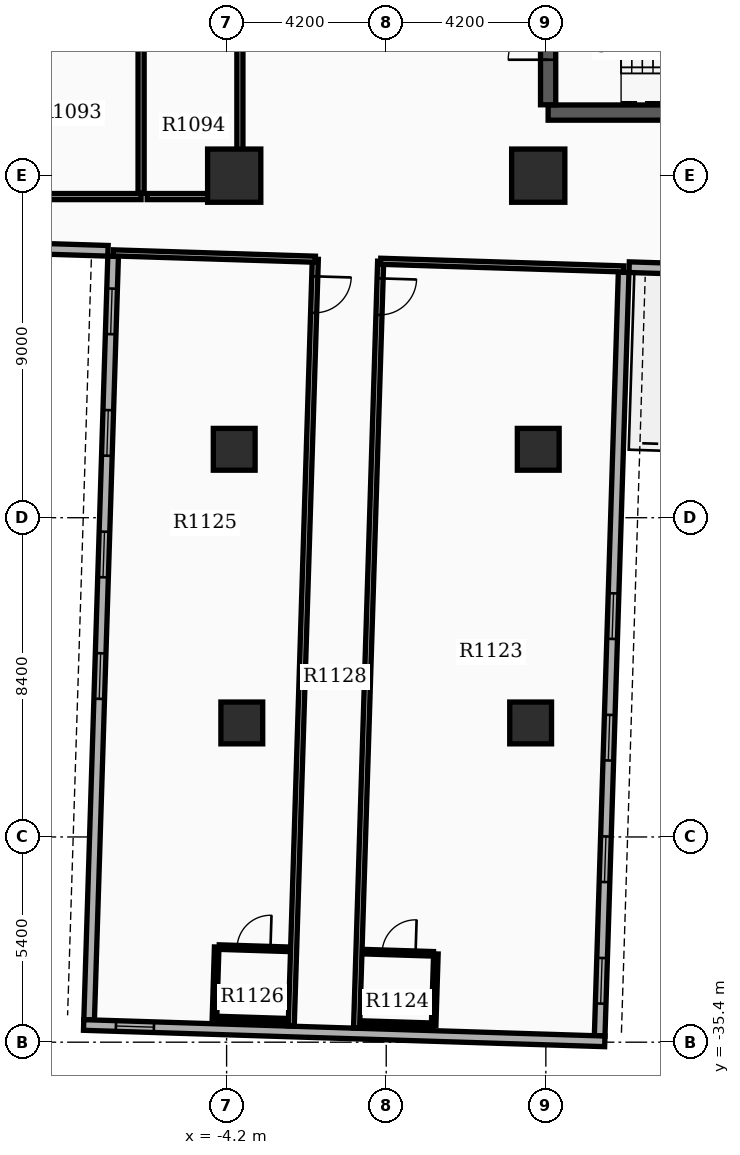
"""IFC4 building model, lengths in metres.
Left out: names, types, materials, properties, quantities, classifications, styles, units other than length and angle.
Written with IfcOpenShell. Run it as: python <this file> out.ifc"""

import sys

from ifc_helpers import new_model, si_unit, direction, frame, frame_2d, origin, origin_2d, place, context, subcontext, project, spatial, rectangle, extrude, element, fill, save


model = new_model("IFC4")
c1 = context("Model", 3, precision=1e-05, world=origin(), true_north=direction((0.0, 1.0)))
c2 = subcontext(c1, "Body", "Model", "MODEL_VIEW")
j1 = project(units=[si_unit("LENGTHUNIT", "METRE"), si_unit("PLANEANGLEUNIT", "RADIAN")], contexts=[c1])
p1 = place(None, origin())
s1 = spatial("IfcSite", under=j1, at=p1, CompositionType="ELEMENT")
p2 = place(p1, origin())
s2 = spatial("IfcBuilding", under=s1, at=p2, CompositionType="ELEMENT")
p3 = place(p2, frame((0.0, 0.0, 71.7)))
s3 = spatial("IfcBuildingStorey", under=s2, at=p3, CompositionType="ELEMENT", Elevation=71.7)
p4 = place(p3, frame((4.26, -10.94, 0.0), z_axis=(0.0, 0.0, 1.0), x_axis=(1.0, 0.0, 0.0)))
e1 = element("IfcWall", 1, at=p4, inside=s3, PredefinedType="SHEAR", context=c2, shape_type="SweptSolid", body=[
    extrude(rectangle(XDim=7.96, YDim=0.4, at=frame_2d((3.98, 0.0))), origin(), (0.0, 0.0, 1.0), 3.7),
])
p5 = place(p3, frame((4.26, -10.735, 0.0), z_axis=(0.0, 0.0, 1.0), x_axis=(0.0, 1.0, 0.0)))
e2 = element("IfcWall", 2, at=p5, inside=s3, PredefinedType="SHEAR", context=c2, shape_type="SweptSolid", body=[
    extrude(rectangle(XDim=3.43, YDim=0.4, at=frame_2d((1.715, 0.0))), origin(), (0.0, 0.0, 1.0), 3.7),
])
p6 = place(p5, frame((1.185, 0.0, 0.0)))
e3 = element("IfcOpeningElement", 3, at=p6, cuts=e2, PredefinedType="OPENING", context=c2, shape_type="SweptSolid", body=[
    extrude(rectangle(XDim=1.05, YDim=2.15, at=frame_2d((0.525, 1.075))), frame((0.0, 0.21, 0.0), z_axis=(0.0, -1.0, 0.0), x_axis=(1.0, 0.0, 0.0)), (0.0, 0.0, 1.0), 0.42),
])
for number, where, z_axis, x_axis in (
    (4, (-4.0, -12.6, 0.0), (0.0, 0.0, 1.0), (1.0, 0.0, 0.0)),
    (5, (4.0, -12.6, 0.0), (0.0, 0.0, 1.0), (1.0, 0.0, 0.0)),
):
    element("IfcColumn", number, at=place(p3, frame(where, z_axis=z_axis, x_axis=x_axis)), inside=s3, PredefinedType="COLUMN", context=c2, shape_type="SweptSolid", body=[
        extrude(rectangle(XDim=1.4, YDim=1.4, at=origin_2d()), origin(), (0.0, 0.0, 1.0), 3.9),
    ])
for number, where, z_axis, x_axis in (
    (6, (-4.0, -19.8, 0.0), (0.0, 0.0, 1.0), (1.0, 0.0, 0.0)),
    (7, (4.0, -19.8, 0.0), (0.0, 0.0, 1.0), (1.0, 0.0, 0.0)),
    (8, (-3.8, -27.0, 0.0), (0.0, 0.0, 1.0), (1.0, 0.0, 0.0)),
    (9, (3.8, -27.0, 0.0), (0.0, 0.0, 1.0), (1.0, 0.0, 0.0)),
):
    element("IfcColumn", number, at=place(p3, frame(where, z_axis=z_axis, x_axis=x_axis)), inside=s3, PredefinedType="COLUMN", context=c2, shape_type="SweptSolid", body=[
        extrude(rectangle(XDim=1.1, YDim=1.1, at=origin_2d()), origin(), (0.0, 0.0, 1.0), 3.9),
    ])
p7 = place(p3, frame((-7.186, -14.721, 0.0), z_axis=(0.0, 0.0, 1.0), x_axis=(-0.031410322165, -0.999506574096, 0.0)))
e10 = element("IfcWall", 10, at=p7, inside=s3, PredefinedType="STANDARD", context=c2, shape_type="SweptSolid", body=[
    extrude(rectangle(XDim=20.1, YDim=0.28, at=frame_2d((10.05, 0.0))), origin(), (0.0, 0.0, 1.0), 2.91),
])
p8 = place(p7, frame((0.85, 0.0, 0.8)))
e11 = element("IfcOpeningElement", 11, at=p8, cuts=e10, PredefinedType="OPENING", context=c2, shape_type="SweptSolid", body=[
    extrude(rectangle(XDim=1.2, YDim=1.6, at=frame_2d((0.6, 0.8))), frame((0.0, 0.15, 0.0), z_axis=(0.0, -1.0, 0.0), x_axis=(1.0, 0.0, 0.0)), (0.0, 0.0, 1.0), 0.3),
])
p9 = place(p7, frame((4.05, 0.0, 0.8)))
e12 = element("IfcOpeningElement", 12, at=p9, cuts=e10, PredefinedType="OPENING", context=c2, shape_type="SweptSolid", body=[
    extrude(rectangle(XDim=1.2, YDim=1.6, at=frame_2d((0.6, 0.8))), frame((0.0, 0.15, 0.0), z_axis=(0.0, -1.0, 0.0), x_axis=(1.0, 0.0, 0.0)), (0.0, 0.0, 1.0), 0.3),
])
p10 = place(p7, frame((7.25, 0.0, 0.8)))
e13 = element("IfcOpeningElement", 13, at=p10, cuts=e10, PredefinedType="OPENING", context=c2, shape_type="SweptSolid", body=[
    extrude(rectangle(XDim=1.2, YDim=1.6, at=frame_2d((0.6, 0.8))), frame((0.0, 0.15, 0.0), z_axis=(0.0, -1.0, 0.0), x_axis=(1.0, 0.0, 0.0)), (0.0, 0.0, 1.0), 0.3),
])
p11 = place(p7, frame((10.45, 0.0, 0.8)))
e14 = element("IfcOpeningElement", 14, at=p11, cuts=e10, PredefinedType="OPENING", context=c2, shape_type="SweptSolid", body=[
    extrude(rectangle(XDim=1.2, YDim=1.6, at=frame_2d((0.6, 0.8))), frame((0.0, 0.15, 0.0), z_axis=(0.0, -1.0, 0.0), x_axis=(1.0, 0.0, 0.0)), (0.0, 0.0, 1.0), 0.3),
])
p12 = place(p3, frame((5.616, -35.234, 0.0), z_axis=(0.0, 0.0, 1.0), x_axis=(0.031398187845, 0.999506955354, 0.0)))
e15 = element("IfcWall", 15, at=p12, inside=s3, PredefinedType="STANDARD", context=c2, shape_type="SweptSolid", body=[
    extrude(rectangle(XDim=20.1, YDim=0.28, at=frame_2d((10.05, 0.0))), origin(), (0.0, 0.0, 1.0), 2.91),
])
p13 = place(p12, frame((0.85, 0.0, 0.8)))
e16 = element("IfcOpeningElement", 16, at=p13, cuts=e15, PredefinedType="OPENING", context=c2, shape_type="SweptSolid", body=[
    extrude(rectangle(XDim=1.2, YDim=1.6, at=frame_2d((0.6, 0.8))), frame((0.0, 0.15, 0.0), z_axis=(0.0, -1.0, 0.0), x_axis=(1.0, 0.0, 0.0)), (0.0, 0.0, 1.0), 0.3),
])
p14 = place(p12, frame((4.05, 0.0, 0.8)))
e17 = element("IfcOpeningElement", 17, at=p14, cuts=e15, PredefinedType="OPENING", context=c2, shape_type="SweptSolid", body=[
    extrude(rectangle(XDim=1.2, YDim=1.6, at=frame_2d((0.6, 0.8))), frame((0.0, 0.15, 0.0), z_axis=(0.0, -1.0, 0.0), x_axis=(1.0, 0.0, 0.0)), (0.0, 0.0, 1.0), 0.3),
])
p15 = place(p12, frame((7.25, 0.0, 0.8)))
e18 = element("IfcOpeningElement", 18, at=p15, cuts=e15, PredefinedType="OPENING", context=c2, shape_type="SweptSolid", body=[
    extrude(rectangle(XDim=1.2, YDim=1.6, at=frame_2d((0.6, 0.8))), frame((0.0, 0.15, 0.0), z_axis=(0.0, -1.0, 0.0), x_axis=(1.0, 0.0, 0.0)), (0.0, 0.0, 1.0), 0.3),
])
p16 = place(p12, frame((10.45, 0.0, 0.8)))
e19 = element("IfcOpeningElement", 19, at=p16, cuts=e15, PredefinedType="OPENING", context=c2, shape_type="SweptSolid", body=[
    extrude(rectangle(XDim=1.2, YDim=1.6, at=frame_2d((0.6, 0.8))), frame((0.0, 0.15, 0.0), z_axis=(0.0, -1.0, 0.0), x_axis=(1.0, 0.0, 0.0)), (0.0, 0.0, 1.0), 0.3),
])
p17 = place(p3, frame((-7.962, -34.947, 0.0), z_axis=(0.0, 0.0, 1.0), x_axis=(0.999506679556, -0.031406966164, 0.0)))
e20 = element("IfcWall", 20, at=p17, inside=s3, PredefinedType="STANDARD", context=c2, shape_type="SweptSolid", body=[
    extrude(rectangle(XDim=13.72, YDim=0.28, at=frame_2d((6.86, 0.0))), origin(), (0.0, 0.0, 1.0), 2.91),
])
p18 = place(p17, frame((0.85, 0.0, 0.85)))
e21 = element("IfcOpeningElement", 21, at=p18, cuts=e20, PredefinedType="OPENING", context=c2, shape_type="SweptSolid", body=[
    extrude(rectangle(XDim=1.0, YDim=1.5, at=frame_2d((0.5, 0.75))), frame((0.0, 0.15, 0.0), z_axis=(0.0, -1.0, 0.0), x_axis=(1.0, 0.0, 0.0)), (0.0, 0.0, 1.0), 0.3),
])
p19 = place(p3, frame((-13.618, -14.379, 0.0), z_axis=(0.0, 0.0, 1.0), x_axis=(0.999507224741, -0.031389611199, 0.0)))
e22 = element("IfcWall", 22, at=p19, inside=s3, PredefinedType="STANDARD", context=c2, shape_type="SweptSolid", body=[
    extrude(rectangle(XDim=6.3, YDim=0.28, at=frame_2d((3.15, 0.0))), origin(), (0.0, 0.0, 1.0), 2.91),
])
p20 = place(p3, frame((12.689, -15.206, 0.0), z_axis=(0.0, 0.0, 1.0), x_axis=(-0.999507262922, 0.031388395416, 0.0)))
e23 = element("IfcWall", 23, at=p20, inside=s3, PredefinedType="STANDARD", context=c2, shape_type="SweptSolid", body=[
    extrude(rectangle(XDim=6.3, YDim=0.28, at=frame_2d((3.15, 0.0))), origin(), (0.0, 0.0, 1.0), 2.91),
])
p21 = place(p3, frame((-12.4, -13.15, 0.0), z_axis=(0.0, 0.0, 1.0), x_axis=(1.0, 0.0, 0.0)))
e24 = element("IfcWall", 24, at=p21, inside=s3, PredefinedType="PARTITIONING", context=c2, shape_type="SweptSolid", body=[
    extrude(rectangle(XDim=5.95, YDim=0.16, at=frame_2d((2.975, 0.0))), origin(), (0.0, 0.0, 1.0), 2.9),
])
p22 = place(p3, frame((-6.45, -13.065, 0.0), z_axis=(0.0, 0.0, 1.0), x_axis=(0.0, 1.0, 0.0)))
e25 = element("IfcWall", 25, at=p22, inside=s3, PredefinedType="PARTITIONING", context=c2, shape_type="SweptSolid", body=[
    extrude(rectangle(XDim=4.23, YDim=0.16, at=frame_2d((2.115, 0.0))), origin(), (0.0, 0.0, 1.0), 2.9),
])
p23 = place(p3, frame((-6.29, -13.15, 0.0), z_axis=(0.0, 0.0, 1.0), x_axis=(1.0, 0.0, 0.0)))
e26 = element("IfcWall", 26, at=p23, inside=s3, PredefinedType="PARTITIONING", context=c2, shape_type="SweptSolid", body=[
    extrude(rectangle(XDim=2.44, YDim=0.16, at=frame_2d((1.22, 0.0))), origin(), (0.0, 0.0, 1.0), 2.9),
])
p24 = place(p3, frame((-3.85, -13.065, 0.0), z_axis=(0.0, 0.0, 1.0), x_axis=(0.0, 1.0, 0.0)))
e27 = element("IfcWall", 27, at=p24, inside=s3, PredefinedType="PARTITIONING", context=c2, shape_type="SweptSolid", body=[
    extrude(rectangle(XDim=4.23, YDim=0.16, at=frame_2d((2.115, 0.0))), origin(), (0.0, 0.0, 1.0), 2.9),
])
p25 = place(p3, frame((-0.146, -14.853, 0.0), z_axis=(0.0, 0.0, 1.0), x_axis=(-0.031415650687, -0.999506406629, 0.0)))
e28 = element("IfcWall", 28, at=p25, inside=s3, PredefinedType="PARTITIONING", context=c2, shape_type="SweptSolid", body=[
    extrude(rectangle(XDim=20.182, YDim=0.16, at=frame_2d((10.091, 0.0))), origin(), (0.0, 0.0, 1.0), 2.9),
])
p26 = place(p25, frame((0.45, 0.0, 0.0)))
e29 = element("IfcOpeningElement", 29, at=p26, cuts=e28, PredefinedType="OPENING", context=c2, shape_type="SweptSolid", body=[
    extrude(rectangle(XDim=0.96, YDim=2.15, at=frame_2d((0.48, 1.075))), frame((0.0, 0.09, 0.0), z_axis=(0.0, -1.0, 0.0), x_axis=(1.0, 0.0, 0.0)), (0.0, 0.0, 1.0), 0.18),
])
p27 = place(p3, frame((-0.146, -14.853, 0.0), z_axis=(0.0, 0.0, 1.0), x_axis=(0.999507038829, -0.031395530436, 0.0)))
e30 = element("IfcWall", 30, at=p27, inside=s3, PredefinedType="PARTITIONING", context=c2, shape_type="SweptSolid", body=[
    extrude(rectangle(XDim=6.4, YDim=0.16, at=frame_2d((3.2, 0.0))), origin(), (0.0, 0.0, 1.0), 2.9),
])
p28 = place(p3, frame((-0.577, -33.018, 0.0), z_axis=(0.0, 0.0, 1.0), x_axis=(0.999511421504, -0.031255692016, 0.0)))
e31 = element("IfcWall", 31, at=p28, inside=s3, PredefinedType="PARTITIONING", context=c2, shape_type="SweptSolid", body=[
    extrude(rectangle(XDim=1.82, YDim=0.12, at=frame_2d((0.91, 0.0))), origin(), (0.0, 0.0, 1.0), 2.9),
])
p29 = place(p28, frame((0.47, 0.0, 0.0)))
e32 = element("IfcOpeningElement", 32, at=p29, cuts=e31, PredefinedType="OPENING", context=c2, shape_type="SweptSolid", body=[
    extrude(rectangle(XDim=0.88, YDim=2.1, at=frame_2d((0.44, 1.05))), frame((0.0, 0.07, 0.0), z_axis=(0.0, -1.0, 0.0), x_axis=(1.0, 0.0, 0.0)), (0.0, 0.0, 1.0), 0.14),
])
p30 = place(p3, frame((-0.636, -34.897, 0.0), z_axis=(0.0, 0.0, 1.0), x_axis=(0.999507221803, -0.031389704724, 0.0)))
e33 = element("IfcWall", 33, at=p30, inside=s3, PredefinedType="PARTITIONING", context=c2, shape_type="SweptSolid", body=[
    extrude(rectangle(XDim=1.82, YDim=0.12, at=frame_2d((0.91, 0.0))), origin(), (0.0, 0.0, 1.0), 2.9),
])
p31 = place(p3, frame((1.307, -33.077, 0.0), z_axis=(0.0, 0.0, 1.0), x_axis=(-0.031429371883, -0.999505975261, 0.0)))
e34 = element("IfcWall", 34, at=p31, inside=s3, PredefinedType="PARTITIONING", context=c2, shape_type="SweptSolid", body=[
    extrude(rectangle(XDim=1.88, YDim=0.12, at=frame_2d((0.94, 0.0))), origin(), (0.0, 0.0, 1.0), 2.9),
])
p32 = place(p3, frame((-1.866, -14.799, 0.0), z_axis=(0.0, 0.0, 1.0), x_axis=(-0.031415650687, -0.999506406629, 0.0)))
e35 = element("IfcWall", 35, at=p32, inside=s3, PredefinedType="PARTITIONING", context=c2, shape_type="SweptSolid", body=[
    extrude(rectangle(XDim=20.182, YDim=0.16, at=frame_2d((10.091, 0.0))), origin(), (0.0, 0.0, 1.0), 2.9),
])
p33 = place(p32, frame((0.45, 0.0, 0.0)))
e36 = element("IfcOpeningElement", 36, at=p33, cuts=e35, PredefinedType="OPENING", context=c2, shape_type="SweptSolid", body=[
    extrude(rectangle(XDim=0.96, YDim=2.15, at=frame_2d((0.48, 1.075))), frame((0.0, 0.09, 0.0), z_axis=(0.0, -1.0, 0.0), x_axis=(1.0, 0.0, 0.0)), (0.0, 0.0, 1.0), 0.18),
])
p34 = place(p3, frame((-1.866, -14.799, 0.0), z_axis=(0.0, 0.0, 1.0), x_axis=(-0.99950722876, 0.031389483217, 0.0)))
e37 = element("IfcWall", 37, at=p34, inside=s3, PredefinedType="PARTITIONING", context=c2, shape_type="SweptSolid", body=[
    extrude(rectangle(XDim=5.32, YDim=0.16, at=frame_2d((2.66, 0.0))), origin(), (0.0, 0.0, 1.0), 2.9),
])
p35 = place(p3, frame((-4.396, -32.898, 0.0), z_axis=(0.0, 0.0, 1.0), x_axis=(0.999507221803, -0.031389704724, 0.0)))
e38 = element("IfcWall", 38, at=p35, inside=s3, PredefinedType="PARTITIONING", context=c2, shape_type="SweptSolid", body=[
    extrude(rectangle(XDim=1.82, YDim=0.12, at=frame_2d((0.91, 0.0))), origin(), (0.0, 0.0, 1.0), 2.9),
])
p36 = place(p35, frame((0.47, 0.0, 0.0)))
e39 = element("IfcOpeningElement", 39, at=p36, cuts=e38, PredefinedType="OPENING", context=c2, shape_type="SweptSolid", body=[
    extrude(rectangle(XDim=0.88, YDim=2.1, at=frame_2d((0.44, 1.05))), frame((0.0, 0.07, 0.0), z_axis=(0.0, -1.0, 0.0), x_axis=(1.0, 0.0, 0.0)), (0.0, 0.0, 1.0), 0.14),
])
p37 = place(p3, frame((-4.455, -34.777, 0.0), z_axis=(0.0, 0.0, 1.0), x_axis=(0.999503004171, -0.03152371574, 0.0)))
e40 = element("IfcWall", 40, at=p37, inside=s3, PredefinedType="PARTITIONING", context=c2, shape_type="SweptSolid", body=[
    extrude(rectangle(XDim=1.82, YDim=0.12, at=frame_2d((0.91, 0.0))), origin(), (0.0, 0.0, 1.0), 2.9),
])
p38 = place(p3, frame((-4.46, -32.896, 0.0), z_axis=(0.0, 0.0, 1.0), x_axis=(-0.031425292588, -0.999506103526, 0.0)))
e41 = element("IfcWall", 41, at=p38, inside=s3, PredefinedType="PARTITIONING", context=c2, shape_type="SweptSolid", body=[
    extrude(rectangle(XDim=1.88, YDim=0.12, at=frame_2d((0.94, 0.0))), origin(), (0.0, 0.0, 1.0), 2.9),
])
p39 = place(p8, origin())
e42 = element("IfcWindow", 42, at=p39, inside=s3, PartitioningType="SINGLE_PANEL", PredefinedType="WINDOW", context=c2, shape_type="SweptSolid", body=[
    extrude(rectangle(XDim=1.2, YDim=1.6, at=frame_2d((0.6, 0.8))), frame((0.0, 0.03, 0.0), z_axis=(0.0, -1.0, 0.0), x_axis=(1.0, 0.0, 0.0)), (0.0, 0.0, 1.0), 0.06),
])
fill(e11, e42)
p40 = place(p9, origin())
e43 = element("IfcWindow", 43, at=p40, inside=s3, PartitioningType="SINGLE_PANEL", PredefinedType="WINDOW", context=c2, shape_type="SweptSolid", body=[
    extrude(rectangle(XDim=1.2, YDim=1.6, at=frame_2d((0.6, 0.8))), frame((0.0, 0.03, 0.0), z_axis=(0.0, -1.0, 0.0), x_axis=(1.0, 0.0, 0.0)), (0.0, 0.0, 1.0), 0.06),
])
fill(e12, e43)
p41 = place(p10, origin())
e44 = element("IfcWindow", 44, at=p41, inside=s3, PartitioningType="SINGLE_PANEL", PredefinedType="WINDOW", context=c2, shape_type="SweptSolid", body=[
    extrude(rectangle(XDim=1.2, YDim=1.6, at=frame_2d((0.6, 0.8))), frame((0.0, 0.03, 0.0), z_axis=(0.0, -1.0, 0.0), x_axis=(1.0, 0.0, 0.0)), (0.0, 0.0, 1.0), 0.06),
])
fill(e13, e44)
p42 = place(p11, origin())
e45 = element("IfcWindow", 45, at=p42, inside=s3, PartitioningType="SINGLE_PANEL", PredefinedType="WINDOW", context=c2, shape_type="SweptSolid", body=[
    extrude(rectangle(XDim=1.2, YDim=1.6, at=frame_2d((0.6, 0.8))), frame((0.0, 0.03, 0.0), z_axis=(0.0, -1.0, 0.0), x_axis=(1.0, 0.0, 0.0)), (0.0, 0.0, 1.0), 0.06),
])
fill(e14, e45)
p43 = place(p13, origin())
e46 = element("IfcWindow", 46, at=p43, inside=s3, PartitioningType="SINGLE_PANEL", PredefinedType="WINDOW", context=c2, shape_type="SweptSolid", body=[
    extrude(rectangle(XDim=1.2, YDim=1.6, at=frame_2d((0.6, 0.8))), frame((0.0, 0.03, 0.0), z_axis=(0.0, -1.0, 0.0), x_axis=(1.0, 0.0, 0.0)), (0.0, 0.0, 1.0), 0.06),
])
fill(e16, e46)
p44 = place(p14, origin())
e47 = element("IfcWindow", 47, at=p44, inside=s3, PartitioningType="SINGLE_PANEL", PredefinedType="WINDOW", context=c2, shape_type="SweptSolid", body=[
    extrude(rectangle(XDim=1.2, YDim=1.6, at=frame_2d((0.6, 0.8))), frame((0.0, 0.03, 0.0), z_axis=(0.0, -1.0, 0.0), x_axis=(1.0, 0.0, 0.0)), (0.0, 0.0, 1.0), 0.06),
])
fill(e17, e47)
p45 = place(p15, origin())
e48 = element("IfcWindow", 48, at=p45, inside=s3, PartitioningType="SINGLE_PANEL", PredefinedType="WINDOW", context=c2, shape_type="SweptSolid", body=[
    extrude(rectangle(XDim=1.2, YDim=1.6, at=frame_2d((0.6, 0.8))), frame((0.0, 0.03, 0.0), z_axis=(0.0, -1.0, 0.0), x_axis=(1.0, 0.0, 0.0)), (0.0, 0.0, 1.0), 0.06),
])
fill(e18, e48)
p46 = place(p16, origin())
e49 = element("IfcWindow", 49, at=p46, inside=s3, PartitioningType="SINGLE_PANEL", PredefinedType="WINDOW", context=c2, shape_type="SweptSolid", body=[
    extrude(rectangle(XDim=1.2, YDim=1.6, at=frame_2d((0.6, 0.8))), frame((0.0, 0.03, 0.0), z_axis=(0.0, -1.0, 0.0), x_axis=(1.0, 0.0, 0.0)), (0.0, 0.0, 1.0), 0.06),
])
fill(e19, e49)
p47 = place(p18, origin())
e50 = element("IfcWindow", 50, at=p47, inside=s3, PartitioningType="SINGLE_PANEL", PredefinedType="WINDOW", context=c2, shape_type="SweptSolid", body=[
    extrude(rectangle(XDim=1.0, YDim=1.5, at=frame_2d((0.5, 0.75))), frame((0.0, 0.03, 0.0), z_axis=(0.0, -1.0, 0.0), x_axis=(1.0, 0.0, 0.0)), (0.0, 0.0, 1.0), 0.06),
])
fill(e21, e50)
p48 = place(p6, origin())
e51 = element("IfcDoor", 51, at=p48, inside=s3, OperationType="SINGLE_SWING_LEFT", PredefinedType="DOOR", context=c2, shape_type="SweptSolid", body=[
    extrude(rectangle(XDim=1.05, YDim=2.15, at=frame_2d((0.525, 1.075))), frame((0.0, 0.025, 0.0), z_axis=(0.0, -1.0, 0.0), x_axis=(1.0, 0.0, 0.0)), (0.0, 0.0, 1.0), 0.05),
])
fill(e3, e51)
p49 = place(p26, origin())
e52 = element("IfcDoor", 52, at=p49, inside=s3, OperationType="SINGLE_SWING_LEFT", PredefinedType="DOOR", context=c2, shape_type="SweptSolid", body=[
    extrude(rectangle(XDim=0.96, YDim=2.15, at=frame_2d((0.48, 1.075))), frame((0.0, 0.025, 0.0), z_axis=(0.0, -1.0, 0.0), x_axis=(1.0, 0.0, 0.0)), (0.0, 0.0, 1.0), 0.05),
])
fill(e29, e52)
p50 = place(p29, origin())
e53 = element("IfcDoor", 53, at=p50, inside=s3, OperationType="SINGLE_SWING_RIGHT", PredefinedType="DOOR", context=c2, shape_type="SweptSolid", body=[
    extrude(rectangle(XDim=0.88, YDim=2.1, at=frame_2d((0.44, 1.05))), frame((0.0, 0.025, 0.0), z_axis=(0.0, -1.0, 0.0), x_axis=(1.0, 0.0, 0.0)), (0.0, 0.0, 1.0), 0.05),
])
fill(e32, e53)
p51 = place(p33, origin())
e54 = element("IfcDoor", 54, at=p51, inside=s3, OperationType="SINGLE_SWING_LEFT", PredefinedType="DOOR", context=c2, shape_type="SweptSolid", body=[
    extrude(rectangle(XDim=0.96, YDim=2.15, at=frame_2d((0.48, 1.075))), frame((0.0, 0.025, 0.0), z_axis=(0.0, -1.0, 0.0), x_axis=(1.0, 0.0, 0.0)), (0.0, 0.0, 1.0), 0.05),
])
fill(e36, e54)
p52 = place(p36, origin())
e55 = element("IfcDoor", 55, at=p52, inside=s3, OperationType="SINGLE_SWING_RIGHT", PredefinedType="DOOR", context=c2, shape_type="SweptSolid", body=[
    extrude(rectangle(XDim=0.88, YDim=2.1, at=frame_2d((0.44, 1.05))), frame((0.0, 0.025, 0.0), z_axis=(0.0, -1.0, 0.0), x_axis=(1.0, 0.0, 0.0)), (0.0, 0.0, 1.0), 0.05),
])
fill(e39, e55)
save(model, sys.argv[1])
